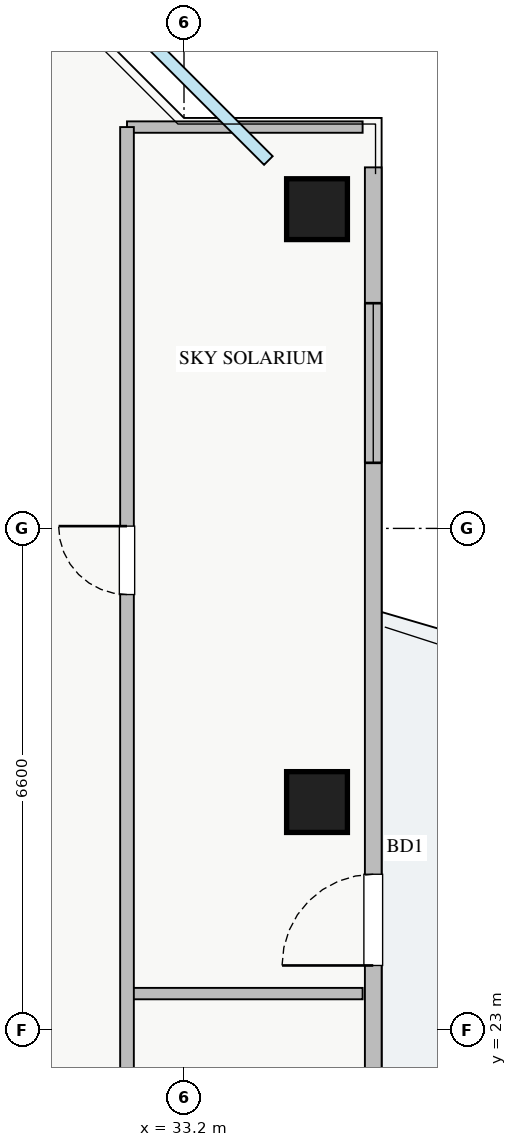
"""IFC4 building model, lengths in metres.
Left out: names, types, materials, properties, quantities, classifications, styles, units other than length and angle.
Written with IfcOpenShell. Run it as: python <this file> out.ifc"""

import sys

from ifc_helpers import new_model, si_unit, direction, frame, frame_2d, origin, origin_2d, place, context, subcontext, project, spatial, rectangle, extrude, source, transform, mapped, element, fill, save


model = new_model("IFC4")
c1 = context("Model", 3, precision=1e-05, world=origin(), true_north=direction((0.0, 1.0)))
c2 = subcontext(c1, "Body", "Model", "MODEL_VIEW")
j1 = project(units=[si_unit("LENGTHUNIT", "METRE"), si_unit("PLANEANGLEUNIT", "RADIAN")], contexts=[c1])
p1 = place(None, origin())
s1 = spatial("IfcSite", under=j1, at=p1, CompositionType="ELEMENT")
p2 = place(p1, origin())
s2 = spatial("IfcBuilding", under=s1, at=p2, CompositionType="ELEMENT")
p3 = place(p2, frame((0.0, 0.0, 190.5)))
s3 = spatial("IfcBuildingStorey", under=s2, at=p3, CompositionType="ELEMENT", Elevation=190.5)
m1 = source(origin(), c2, "Body", "SweptSolid", [
    extrude(rectangle(XDim=0.8, YDim=0.8, at=origin_2d()), origin(), (0.0, 0.0, 1.0), 3.25),
])
for number, where, z_axis, x_axis in (
    (1, (34.95, 26.0, 0.0), (0.0, 0.0, 1.0), (1.0, 0.0, 0.0)),
    (2, (34.95, 33.8, 0.0), (0.0, 0.0, 1.0), (1.0, 0.0, 0.0)),
):
    element("IfcColumn", number, at=place(p3, frame(where, z_axis=z_axis, x_axis=x_axis)), inside=s3, PredefinedType="COLUMN", context=c2, shape_type="MappedRepresentation", body=[
        mapped(m1, transform((0.0, 0.0, 0.0), x_axis=(1.0, 0.0, 0.0), y_axis=(0.0, 1.0, 0.0), z_axis=(0.0, 0.0, 1.0), scale=1.0)),
    ])
p4 = place(p3, frame((35.69, 11.65, 0.0), z_axis=(0.0, 0.0, 1.0), x_axis=(0.0, 1.0, 0.0)))
e3 = element("IfcWall", 3, at=p4, inside=s3, PredefinedType="STANDARD", context=c2, shape_type="SweptSolid", body=[
    extrude(rectangle(XDim=22.7, YDim=0.22, at=frame_2d((11.35, 0.0))), origin(), (0.0, 0.0, 1.0), 2.61),
])
p5 = place(p4, frame((12.2, 0.0, 0.0)))
e4 = element("IfcOpeningElement", 4, at=p5, cuts=e3, PredefinedType="OPENING", context=c2, shape_type="SweptSolid", body=[
    extrude(rectangle(XDim=1.2, YDim=2.1, at=frame_2d((0.6, 1.05))), frame((0.0, 0.12, 0.0), z_axis=(0.0, -1.0, 0.0), x_axis=(1.0, 0.0, 0.0)), (0.0, 0.0, 1.0), 0.24),
])
p6 = place(p4, frame((1.638, 0.0, 0.9)))
e5 = element("IfcOpeningElement", 5, at=p6, cuts=e3, PredefinedType="OPENING", context=c2, shape_type="SweptSolid", body=[
    extrude(rectangle(XDim=2.4, YDim=1.48, at=frame_2d((1.2, 0.74))), frame((0.0, 0.12, 0.0), z_axis=(0.0, -1.0, 0.0), x_axis=(1.0, 0.0, 0.0)), (0.0, 0.0, 1.0), 0.24),
])
p7 = place(p4, frame((18.813, 0.0, 0.9)))
e6 = element("IfcOpeningElement", 6, at=p7, cuts=e3, PredefinedType="OPENING", context=c2, shape_type="SweptSolid", body=[
    extrude(rectangle(XDim=2.1, YDim=1.48, at=frame_2d((1.05, 0.74))), frame((0.0, 0.12, 0.0), z_axis=(0.0, -1.0, 0.0), x_axis=(1.0, 0.0, 0.0)), (0.0, 0.0, 1.0), 0.24),
])
for number, where, z_axis, x_axis in (
    (7, (32.45, 34.88, 0.0), (0.0, 0.0, 1.0), (1.0, 0.0, 0.0)),
    (8, (32.45, 23.48, 0.0), (0.0, 0.0, 1.0), (1.0, 0.0, 0.0)),
):
    element("IfcWall", number, at=place(p3, frame(where, z_axis=z_axis, x_axis=x_axis)), inside=s3, PredefinedType="PARTITIONING", context=c2, shape_type="SweptSolid", body=[
        extrude(rectangle(XDim=3.1, YDim=0.15, at=frame_2d((1.55, 0.0))), origin(), (0.0, 0.0, 1.0), 3.07),
    ])
p8 = place(p3, frame((32.45, 11.12, 0.0), z_axis=(0.0, 0.0, 1.0), x_axis=(0.0, 1.0, 0.0)))
e9 = element("IfcWall", 9, at=p8, inside=s3, PredefinedType="PARTITIONING", context=c2, shape_type="SweptSolid", body=[
    extrude(rectangle(XDim=23.76, YDim=0.18, at=frame_2d((11.88, 0.0))), origin(), (0.0, 0.0, 1.0), 3.07),
])
p9 = place(p8, frame((5.73, 0.0, 0.0)))
e10 = element("IfcOpeningElement", 10, at=p9, cuts=e9, PredefinedType="OPENING", context=c2, shape_type="SweptSolid", body=[
    extrude(rectangle(XDim=0.9, YDim=2.05, at=frame_2d((0.45, 1.025))), frame((0.0, 0.1, 0.0), z_axis=(0.0, -1.0, 0.0), x_axis=(1.0, 0.0, 0.0)), (0.0, 0.0, 1.0), 0.2),
])
p10 = place(p8, frame((17.61, 0.0, 0.0)))
e11 = element("IfcOpeningElement", 11, at=p10, cuts=e9, PredefinedType="OPENING", context=c2, shape_type="SweptSolid", body=[
    extrude(rectangle(XDim=0.9, YDim=2.05, at=frame_2d((0.45, 1.025))), frame((0.0, 0.1, 0.0), z_axis=(0.0, -1.0, 0.0), x_axis=(1.0, 0.0, 0.0)), (0.0, 0.0, 1.0), 0.2),
])
m2 = source(origin(), c2, "Body", "SweptSolid", [
    extrude(rectangle(XDim=1.2, YDim=2.1, at=frame_2d((0.6, 1.05))), frame((0.0, 0.025, 0.0), z_axis=(0.0, -1.0, 0.0), x_axis=(1.0, 0.0, 0.0)), (0.0, 0.0, 1.0), 0.05),
])
p11 = place(p5, origin())
e12 = element("IfcDoor", 12, at=p11, inside=s3, OperationType="SINGLE_SWING_LEFT", PredefinedType="DOOR", context=c2, shape_type="MappedRepresentation", body=[
    mapped(m2, transform((0.0, 0.0, 0.0), x_axis=(1.0, 0.0, 0.0), y_axis=(0.0, 1.0, 0.0), z_axis=(0.0, 0.0, 1.0), scale=1.0)),
])
fill(e4, e12)
m3 = source(origin(), c2, "Body", "SweptSolid", [
    extrude(rectangle(XDim=2.1, YDim=1.48, at=frame_2d((1.05, 0.74))), frame((0.0, 0.03, 0.0), z_axis=(0.0, -1.0, 0.0), x_axis=(1.0, 0.0, 0.0)), (0.0, 0.0, 1.0), 0.06),
])
p12 = place(p7, origin())
e13 = element("IfcWindow", 13, at=p12, inside=s3, PartitioningType="TRIPLE_PANEL_VERTICAL", PredefinedType="WINDOW", context=c2, shape_type="MappedRepresentation", body=[
    mapped(m3, transform((0.0, 0.0, 0.0), x_axis=(1.0, 0.0, 0.0), y_axis=(0.0, 1.0, 0.0), z_axis=(0.0, 0.0, 1.0), scale=1.0)),
])
fill(e6, e13)
m4 = source(origin(), c2, "Body", "SweptSolid", [
    extrude(rectangle(XDim=0.9, YDim=2.05, at=frame_2d((0.45, 1.025))), frame((0.0, 0.025, 0.0), z_axis=(0.0, -1.0, 0.0), x_axis=(1.0, 0.0, 0.0)), (0.0, 0.0, 1.0), 0.05),
])
p13 = place(p10, origin())
e14 = element("IfcDoor", 14, at=p13, inside=s3, OperationType="SINGLE_SWING_RIGHT", PredefinedType="DOOR", context=c2, shape_type="MappedRepresentation", body=[
    mapped(m4, transform((0.0, 0.0, 0.0), x_axis=(1.0, 0.0, 0.0), y_axis=(0.0, 1.0, 0.0), z_axis=(0.0, 0.0, 1.0), scale=1.0)),
])
fill(e11, e14)
save(model, sys.argv[1])
